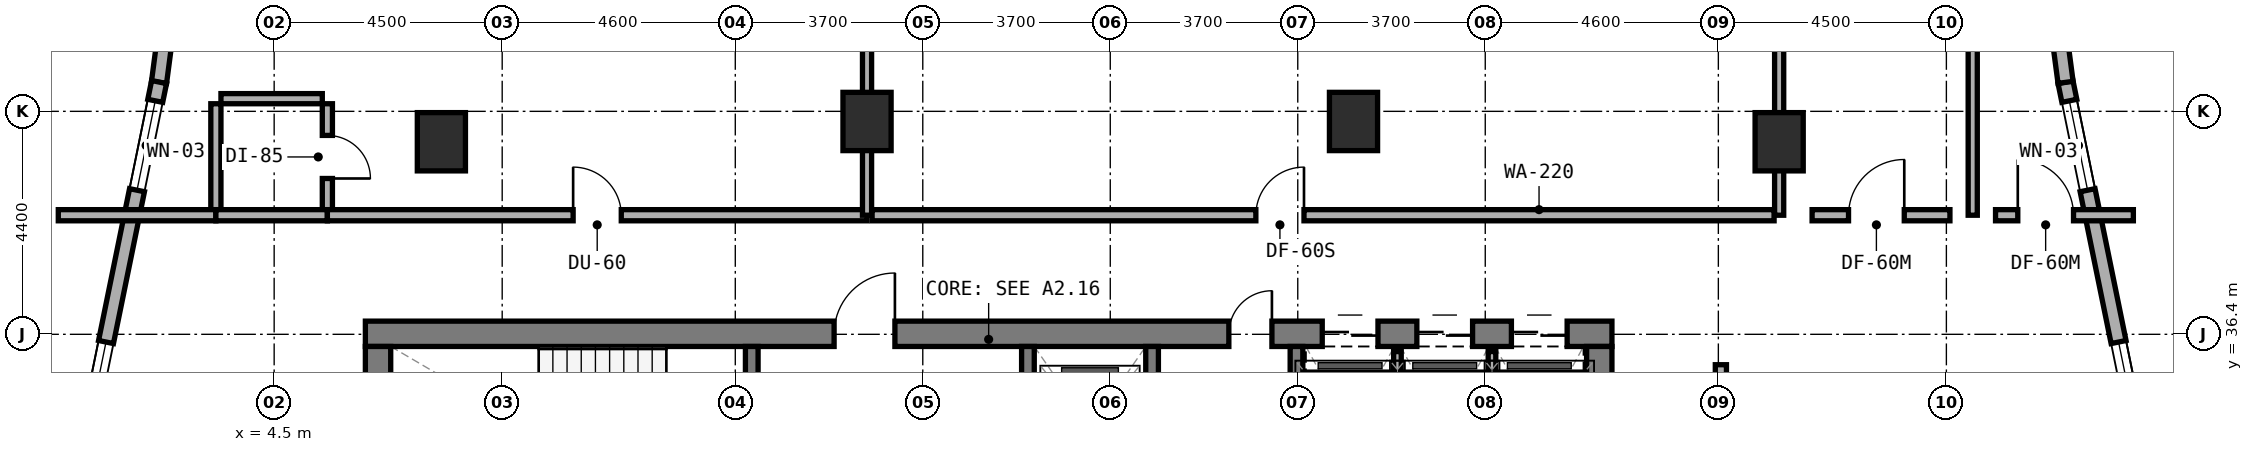
"""IFC4 building model, lengths in metres.
Left out: names, types, materials, properties, quantities, classifications, styles, units other than length and angle.
Written with IfcOpenShell. Run it as: python <this file> out.ifc"""

import sys

from ifc_helpers import new_model, si_unit, direction, frame, frame_2d, origin, origin_2d, place, context, subcontext, project, spatial, rectangle, extrude, element, fill, save


model = new_model("IFC4")
c1 = context("Model", 3, precision=1e-05, world=origin(), true_north=direction((0.0, 1.0)))
c2 = subcontext(c1, "Body", "Model", "MODEL_VIEW")
j1 = project(units=[si_unit("LENGTHUNIT", "METRE"), si_unit("PLANEANGLEUNIT", "RADIAN")], contexts=[c1])
p1 = place(None, origin())
s1 = spatial("IfcSite", under=j1, at=p1, CompositionType="ELEMENT")
p2 = place(p1, origin())
s2 = spatial("IfcBuilding", under=s1, at=p2, CompositionType="ELEMENT")
p3 = place(p2, frame((0.0, 0.0, 62.5)))
s3 = spatial("IfcBuildingStorey", under=s2, at=p3, CompositionType="ELEMENT", Elevation=62.5)
p4 = place(p3, frame((6.3, 36.41, 0.0), z_axis=(0.0, 0.0, 1.0), x_axis=(1.0, 0.0, 0.0)))
e1 = element("IfcWall", 1, at=p4, inside=s3, PredefinedType="SHEAR", context=c2, shape_type="SweptSolid", body=[
    extrude(rectangle(XDim=24.6, YDim=0.5, at=frame_2d((12.3, 0.0))), origin(), (0.0, 0.0, 1.0), 3.5),
])
p5 = place(p4, frame((9.25, 0.0, 0.0)))
e2 = element("IfcOpeningElement", 2, at=p5, cuts=e1, PredefinedType="OPENING", context=c2, shape_type="SweptSolid", body=[
    extrude(rectangle(XDim=1.2, YDim=2.15, at=frame_2d((0.6, 1.075))), frame((0.0, 0.26, 0.0), z_axis=(0.0, -1.0, 0.0), x_axis=(1.0, 0.0, 0.0)), (0.0, 0.0, 1.0), 0.52),
])
p6 = place(p4, frame((17.04, 0.0, 0.0)))
e3 = element("IfcOpeningElement", 3, at=p6, cuts=e1, PredefinedType="OPENING", context=c2, shape_type="SweptSolid", body=[
    extrude(rectangle(XDim=0.85, YDim=2.1, at=frame_2d((0.425, 1.05))), frame((0.0, 0.26, 0.0), z_axis=(0.0, -1.0, 0.0), x_axis=(1.0, 0.0, 0.0)), (0.0, 0.0, 1.0), 0.52),
])
p7 = place(p4, frame((18.883, 0.0, 0.0)))
e4 = element("IfcOpeningElement", 4, at=p7, cuts=e1, PredefinedType="OPENING", context=c2, shape_type="SweptSolid", body=[
    extrude(rectangle(XDim=1.1, YDim=2.15, at=frame_2d((0.55, 1.075))), frame((0.0, 0.26, 0.0), z_axis=(0.0, -1.0, 0.0), x_axis=(1.0, 0.0, 0.0)), (0.0, 0.0, 1.0), 0.52),
])
p8 = place(p4, frame((20.75, 0.0, 0.0)))
e5 = element("IfcOpeningElement", 5, at=p8, cuts=e1, PredefinedType="OPENING", context=c2, shape_type="SweptSolid", body=[
    extrude(rectangle(XDim=1.1, YDim=2.15, at=frame_2d((0.55, 1.075))), frame((0.0, 0.26, 0.0), z_axis=(0.0, -1.0, 0.0), x_axis=(1.0, 0.0, 0.0)), (0.0, 0.0, 1.0), 0.52),
])
p9 = place(p4, frame((22.616, 0.0, 0.0)))
e6 = element("IfcOpeningElement", 6, at=p9, cuts=e1, PredefinedType="OPENING", context=c2, shape_type="SweptSolid", body=[
    extrude(rectangle(XDim=1.1, YDim=2.15, at=frame_2d((0.55, 1.075))), frame((0.0, 0.26, 0.0), z_axis=(0.0, -1.0, 0.0), x_axis=(1.0, 0.0, 0.0)), (0.0, 0.0, 1.0), 0.52),
])
for number, where, z_axis, x_axis in (
    (7, (6.55, 33.0, 0.0), (0.0, 0.0, 1.0), (0.0, 1.0, 0.0)),
    (8, (30.65, 33.0, 0.0), (0.0, 0.0, 1.0), (0.0, 1.0, 0.0)),
):
    element("IfcWall", number, at=place(p3, frame(where, z_axis=z_axis, x_axis=x_axis)), inside=s3, PredefinedType="SHEAR", context=c2, shape_type="SweptSolid", body=[
        extrude(rectangle(XDim=3.16, YDim=0.5, at=frame_2d((1.58, 0.0))), origin(), (0.0, 0.0, 1.0), 3.5),
    ])
p10 = place(p3, frame((13.925, 33.0, 0.0), z_axis=(0.0, 0.0, 1.0), x_axis=(0.0, 1.0, 0.0)))
e9 = element("IfcWall", 9, at=p10, inside=s3, PredefinedType="STANDARD", context=c2, shape_type="SweptSolid", body=[
    extrude(rectangle(XDim=3.16, YDim=0.25, at=frame_2d((1.58, 0.0))), origin(), (0.0, 0.0, 1.0), 3.22),
])
p11 = place(p10, frame((0.98, 0.0, 0.0)))
e10 = element("IfcOpeningElement", 10, at=p11, cuts=e9, PredefinedType="OPENING", context=c2, shape_type="SweptSolid", body=[
    extrude(rectangle(XDim=1.1, YDim=2.15, at=frame_2d((0.55, 1.075))), frame((0.0, 0.135, 0.0), z_axis=(0.0, -1.0, 0.0), x_axis=(1.0, 0.0, 0.0)), (0.0, 0.0, 1.0), 0.27),
])
p12 = place(p3, frame((19.375, 33.0, 0.0), z_axis=(0.0, 0.0, 1.0), x_axis=(0.0, 1.0, 0.0)))
e11 = element("IfcWall", 11, at=p12, inside=s3, PredefinedType="STANDARD", context=c2, shape_type="SweptSolid", body=[
    extrude(rectangle(XDim=3.16, YDim=0.25, at=frame_2d((1.58, 0.0))), origin(), (0.0, 0.0, 1.0), 3.22),
])
p13 = place(p12, frame((0.98, 0.0, 0.0)))
e12 = element("IfcOpeningElement", 12, at=p13, cuts=e11, PredefinedType="OPENING", context=c2, shape_type="SweptSolid", body=[
    extrude(rectangle(XDim=1.1, YDim=2.15, at=frame_2d((0.55, 1.075))), frame((0.0, 0.135, 0.0), z_axis=(0.0, -1.0, 0.0), x_axis=(1.0, 0.0, 0.0)), (0.0, 0.0, 1.0), 0.27),
])
for number, where, z_axis, x_axis in (
    (13, (21.825, 33.0, 0.0), (0.0, 0.0, 1.0), (0.0, 1.0, 0.0)),
    (14, (24.675, 33.0, 0.0), (0.0, 0.0, 1.0), (0.0, 1.0, 0.0)),
):
    element("IfcWall", number, at=place(p3, frame(where, z_axis=z_axis, x_axis=x_axis)), inside=s3, PredefinedType="STANDARD", context=c2, shape_type="SweptSolid", body=[
        extrude(rectangle(XDim=3.16, YDim=0.25, at=frame_2d((1.58, 0.0))), origin(), (0.0, 0.0, 1.0), 3.22),
    ])
for number, where, z_axis, x_axis in (
    (15, (16.2, 40.6, 0.0), (0.0, 0.0, 1.0), (1.0, 0.0, 0.0)),
    (16, (25.8, 40.6, 0.0), (0.0, 0.0, 1.0), (1.0, 0.0, 0.0)),
    (17, (34.2, 40.2, 0.0), (0.0, 0.0, 1.0), (1.0, 0.0, 0.0)),
    (18, (7.8, 40.2, 0.0), (0.0, 0.0, 1.0), (1.0, 0.0, 0.0)),
):
    element("IfcColumn", number, at=place(p3, frame(where, z_axis=z_axis, x_axis=x_axis)), inside=s3, PredefinedType="COLUMN", context=c2, shape_type="SweptSolid", body=[
        extrude(rectangle(XDim=0.95, YDim=1.15, at=origin_2d()), origin(), (0.0, 0.0, 1.0), 3.5),
    ])
p14 = place(p3, frame((41.864, 31.516, 0.0), z_axis=(0.0, 0.0, 1.0), x_axis=(-0.199990901713, 0.979797754249, 0.0)))
e19 = element("IfcWall", 19, at=p14, inside=s3, PredefinedType="STANDARD", context=c2, shape_type="SweptSolid", body=[
    extrude(rectangle(XDim=10.065, YDim=0.3, at=frame_2d((5.033, 0.0))), origin(), (0.0, 0.0, 1.0), 3.22),
])
p15 = place(p14, frame((2.429, 0.0, 0.8)))
e20 = element("IfcOpeningElement", 20, at=p15, cuts=e19, PredefinedType="OPENING", context=c2, shape_type="SweptSolid", body=[
    extrude(rectangle(XDim=2.4, YDim=1.6, at=frame_2d((1.2, 0.8))), frame((0.0, 0.16, 0.0), z_axis=(0.0, -1.0, 0.0), x_axis=(1.0, 0.0, 0.0)), (0.0, 0.0, 1.0), 0.32),
])
p16 = place(p14, frame((7.887, 0.0, 0.85)))
e21 = element("IfcOpeningElement", 21, at=p16, cuts=e19, PredefinedType="OPENING", context=c2, shape_type="SweptSolid", body=[
    extrude(rectangle(XDim=1.8, YDim=1.5, at=frame_2d((0.9, 0.75))), frame((0.0, 0.16, 0.0), z_axis=(0.0, -1.0, 0.0), x_axis=(1.0, 0.0, 0.0)), (0.0, 0.0, 1.0), 0.32),
])
p17 = place(p3, frame((39.852, 41.372, 0.0), z_axis=(0.0, 0.0, 1.0), x_axis=(-0.131174864804, 0.991359246108, 0.0)))
e22 = element("IfcWall", 22, at=p17, inside=s3, PredefinedType="STANDARD", context=c2, shape_type="SweptSolid", body=[
    extrude(rectangle(XDim=0.938, YDim=0.3, at=frame_2d((0.469, 0.0))), origin(), (0.0, 0.0, 1.0), 3.22),
])
p18 = place(p3, frame((2.355, 42.337, 0.0), z_axis=(0.0, 0.0, 1.0), x_axis=(-0.130454512571, -0.991454295543, 0.0)))
e23 = element("IfcWall", 23, at=p18, inside=s3, PredefinedType="STANDARD", context=c2, shape_type="SweptSolid", body=[
    extrude(rectangle(XDim=0.973, YDim=0.3, at=frame_2d((0.487, 0.0))), origin(), (0.0, 0.0, 1.0), 3.22),
])
p19 = place(p3, frame((2.229, 41.378, 0.0), z_axis=(0.0, 0.0, 1.0), x_axis=(-0.199990901713, -0.979797754249, 0.0)))
e24 = element("IfcWall", 24, at=p19, inside=s3, PredefinedType="STANDARD", context=c2, shape_type="SweptSolid", body=[
    extrude(rectangle(XDim=10.065, YDim=0.3, at=frame_2d((5.033, 0.0))), origin(), (0.0, 0.0, 1.0), 3.22),
])
p20 = place(p19, frame((0.378, 0.0, 0.85)))
e25 = element("IfcOpeningElement", 25, at=p20, cuts=e24, PredefinedType="OPENING", context=c2, shape_type="SweptSolid", body=[
    extrude(rectangle(XDim=1.8, YDim=1.5, at=frame_2d((0.9, 0.75))), frame((0.0, 0.16, 0.0), z_axis=(0.0, -1.0, 0.0), x_axis=(1.0, 0.0, 0.0)), (0.0, 0.0, 1.0), 0.32),
])
p21 = place(p19, frame((5.236, 0.0, 0.8)))
e26 = element("IfcOpeningElement", 26, at=p21, cuts=e24, PredefinedType="OPENING", context=c2, shape_type="SweptSolid", body=[
    extrude(rectangle(XDim=2.4, YDim=1.6, at=frame_2d((1.2, 0.8))), frame((0.0, 0.16, 0.0), z_axis=(0.0, -1.0, 0.0), x_axis=(1.0, 0.0, 0.0)), (0.0, 0.0, 1.0), 0.32),
])
p22 = place(p3, frame((26.667, 33.1, 0.0), z_axis=(0.0, 0.0, 1.0), x_axis=(0.0, 1.0, 0.0)))
e27 = element("IfcWall", 27, at=p22, inside=s3, PredefinedType="PARTITIONING", context=c2, shape_type="SweptSolid", body=[
    extrude(rectangle(XDim=2.96, YDim=0.15, at=frame_2d((1.48, 0.0))), origin(), (0.0, 0.0, 1.0), 3.22),
])
p23 = place(p3, frame((28.533, 33.1, 0.0), z_axis=(0.0, 0.0, 1.0), x_axis=(0.0, 1.0, 0.0)))
e28 = element("IfcWall", 28, at=p23, inside=s3, PredefinedType="PARTITIONING", context=c2, shape_type="SweptSolid", body=[
    extrude(rectangle(XDim=2.96, YDim=0.15, at=frame_2d((1.48, 0.0))), origin(), (0.0, 0.0, 1.0), 2.495),
])
p24 = place(p3, frame((5.55, 38.85, 0.0), z_axis=(0.0, 0.0, 1.0), x_axis=(0.0, 1.0, 0.0)))
e29 = element("IfcWall", 29, at=p24, inside=s3, PredefinedType="PLUMBINGWALL", context=c2, shape_type="SweptSolid", body=[
    extrude(rectangle(XDim=2.1, YDim=0.2, at=frame_2d((1.05, 0.0))), origin(), (0.0, 0.0, 1.0), 3.22),
])
p25 = place(p24, frame((0.625, 0.0, 0.0)))
e30 = element("IfcOpeningElement", 30, at=p25, cuts=e29, PredefinedType="OPENING", context=c2, shape_type="SweptSolid", body=[
    extrude(rectangle(XDim=0.85, YDim=2.1, at=frame_2d((0.425, 1.05))), frame((0.0, 0.11, 0.0), z_axis=(0.0, -1.0, 0.0), x_axis=(1.0, 0.0, 0.0)), (0.0, 0.0, 1.0), 0.22),
])
p26 = place(p3, frame((3.45, 41.05, 0.0), z_axis=(0.0, 0.0, 1.0), x_axis=(1.0, 0.0, 0.0)))
e31 = element("IfcWall", 31, at=p26, inside=s3, PredefinedType="PLUMBINGWALL", context=c2, shape_type="SweptSolid", body=[
    extrude(rectangle(XDim=2.0, YDim=0.2, at=frame_2d((1.0, 0.0))), origin(), (0.0, 0.0, 1.0), 3.22),
])
p27 = place(p3, frame((3.35, 38.85, 0.0), z_axis=(0.0, 0.0, 1.0), x_axis=(0.0, 1.0, 0.0)))
e32 = element("IfcWall", 32, at=p27, inside=s3, PredefinedType="PLUMBINGWALL", context=c2, shape_type="SweptSolid", body=[
    extrude(rectangle(XDim=2.1, YDim=0.2, at=frame_2d((1.05, 0.0))), origin(), (0.0, 0.0, 1.0), 3.22),
])
p28 = place(p3, frame((0.24, 38.75, 0.0), z_axis=(0.0, 0.0, 1.0), x_axis=(1.0, 0.0, 0.0)))
e33 = element("IfcWall", 33, at=p28, inside=s3, PredefinedType="SOLIDWALL", context=c2, shape_type="SweptSolid", body=[
    extrude(rectangle(XDim=3.11, YDim=0.22, at=frame_2d((1.555, 0.0))), origin(), (0.0, 0.0, 1.0), 3.22),
])
p29 = place(p3, frame((3.35, 38.75, 0.0), z_axis=(0.0, 0.0, 1.0), x_axis=(1.0, 0.0, 0.0)))
e34 = element("IfcWall", 34, at=p29, inside=s3, PredefinedType="SOLIDWALL", context=c2, shape_type="SweptSolid", body=[
    extrude(rectangle(XDim=2.2, YDim=0.22, at=frame_2d((1.1, 0.0))), origin(), (0.0, 0.0, 1.0), 3.22),
])
p30 = place(p3, frame((5.55, 38.75, 0.0), z_axis=(0.0, 0.0, 1.0), x_axis=(1.0, 0.0, 0.0)))
e35 = element("IfcWall", 35, at=p30, inside=s3, PredefinedType="SOLIDWALL", context=c2, shape_type="SweptSolid", body=[
    extrude(rectangle(XDim=10.65, YDim=0.22, at=frame_2d((5.325, 0.0))), origin(), (0.0, 0.0, 1.0), 2.495),
])
p31 = place(p30, frame((4.85, 0.0, 0.0)))
e36 = element("IfcOpeningElement", 36, at=p31, cuts=e35, PredefinedType="OPENING", context=c2, shape_type="SweptSolid", body=[
    extrude(rectangle(XDim=0.95, YDim=2.1, at=frame_2d((0.475, 1.05))), frame((0.0, 0.12, 0.0), z_axis=(0.0, -1.0, 0.0), x_axis=(1.0, 0.0, 0.0)), (0.0, 0.0, 1.0), 0.24),
])
p32 = place(p3, frame((16.2, 38.75, 0.0), z_axis=(0.0, 0.0, 1.0), x_axis=(0.0, 1.0, 0.0)))
e37 = element("IfcWall", 37, at=p32, inside=s3, PredefinedType="SOLIDWALL", context=c2, shape_type="SweptSolid", body=[
    extrude(rectangle(XDim=8.19, YDim=0.18, at=frame_2d((4.095, 0.0))), origin(), (0.0, 0.0, 1.0), 2.495),
])
p33 = place(p3, frame((16.3, 38.75, 0.0), z_axis=(0.0, 0.0, 1.0), x_axis=(1.0, 0.0, 0.0)))
e38 = element("IfcWall", 38, at=p33, inside=s3, PredefinedType="SOLIDWALL", context=c2, shape_type="SweptSolid", body=[
    extrude(rectangle(XDim=17.8, YDim=0.22, at=frame_2d((8.9, 0.0))), origin(), (0.0, 0.0, 1.0), 2.495),
])
p34 = place(p33, frame((7.573, 0.0, 0.0)))
e39 = element("IfcOpeningElement", 39, at=p34, cuts=e38, PredefinedType="OPENING", context=c2, shape_type="SweptSolid", body=[
    extrude(rectangle(XDim=0.95, YDim=2.1, at=frame_2d((0.475, 1.05))), frame((0.0, 0.12, 0.0), z_axis=(0.0, -1.0, 0.0), x_axis=(1.0, 0.0, 0.0)), (0.0, 0.0, 1.0), 0.24),
])
p35 = place(p3, frame((34.2, 38.75, 0.0), z_axis=(0.0, 0.0, 1.0), x_axis=(0.0, 1.0, 0.0)))
e40 = element("IfcWall", 40, at=p35, inside=s3, PredefinedType="SOLIDWALL", context=c2, shape_type="SweptSolid", body=[
    extrude(rectangle(XDim=6.674, YDim=0.18, at=frame_2d((3.337, 0.0))), origin(), (0.0, 0.0, 1.0), 2.495),
])
p36 = place(p3, frame((38.02, 38.75, 0.0), z_axis=(0.0, 0.0, 1.0), x_axis=(0.0, 1.0, 0.0)))
e41 = element("IfcWall", 41, at=p36, inside=s3, PredefinedType="SOLIDWALL", context=c2, shape_type="SweptSolid", body=[
    extrude(rectangle(XDim=5.778, YDim=0.18, at=frame_2d((2.889, 0.0))), origin(), (0.0, 0.0, 1.0), 3.22),
])
p37 = place(p3, frame((34.85, 38.75, 0.0), z_axis=(0.0, 0.0, 1.0), x_axis=(1.0, 0.0, 0.0)))
e42 = element("IfcWall", 42, at=p37, inside=s3, PredefinedType="SOLIDWALL", context=c2, shape_type="SweptSolid", body=[
    extrude(rectangle(XDim=2.72, YDim=0.22, at=frame_2d((1.36, 0.0))), origin(), (0.0, 0.0, 1.0), 3.22),
])
p38 = place(p37, frame((0.719, 0.0, 0.0)))
e43 = element("IfcOpeningElement", 43, at=p38, cuts=e42, PredefinedType="OPENING", context=c2, shape_type="SweptSolid", body=[
    extrude(rectangle(XDim=1.1, YDim=2.1, at=frame_2d((0.55, 1.05))), frame((0.0, 0.12, 0.0), z_axis=(0.0, -1.0, 0.0), x_axis=(1.0, 0.0, 0.0)), (0.0, 0.0, 1.0), 0.24),
])
p39 = place(p3, frame((38.47, 38.75, 0.0), z_axis=(0.0, 0.0, 1.0), x_axis=(1.0, 0.0, 0.0)))
e44 = element("IfcWall", 44, at=p39, inside=s3, PredefinedType="SOLIDWALL", context=c2, shape_type="SweptSolid", body=[
    extrude(rectangle(XDim=2.72, YDim=0.22, at=frame_2d((1.36, 0.0))), origin(), (0.0, 0.0, 1.0), 3.22),
])
p40 = place(p39, frame((0.439, 0.0, 0.0)))
e45 = element("IfcOpeningElement", 45, at=p40, cuts=e44, PredefinedType="OPENING", context=c2, shape_type="SweptSolid", body=[
    extrude(rectangle(XDim=1.1, YDim=2.1, at=frame_2d((0.55, 1.05))), frame((0.0, 0.12, 0.0), z_axis=(0.0, -1.0, 0.0), x_axis=(1.0, 0.0, 0.0)), (0.0, 0.0, 1.0), 0.24),
])
p41 = place(p3, frame((33.05, 25.66, 0.0), z_axis=(0.0, 0.0, 1.0), x_axis=(0.0, 1.0, 0.0)))
e46 = element("IfcWall", 46, at=p41, inside=s3, PredefinedType="SOLIDWALL", context=c2, shape_type="SweptSolid", body=[
    extrude(rectangle(XDim=10.14, YDim=0.22, at=frame_2d((5.07, 0.0))), origin(), (0.0, 0.0, 1.0), 2.495),
])
p42 = place(p41, frame((4.595, 0.0, 0.0)))
e47 = element("IfcOpeningElement", 47, at=p42, cuts=e46, PredefinedType="OPENING", context=c2, shape_type="SweptSolid", body=[
    extrude(rectangle(XDim=0.95, YDim=2.1, at=frame_2d((0.475, 1.05))), frame((0.0, 0.12, 0.0), z_axis=(0.0, -1.0, 0.0), x_axis=(1.0, 0.0, 0.0)), (0.0, 0.0, 1.0), 0.24),
])
p43 = place(p15, origin())
e48 = element("IfcWindow", 48, at=p43, inside=s3, PartitioningType="SINGLE_PANEL", PredefinedType="WINDOW", context=c2, shape_type="SweptSolid", body=[
    extrude(rectangle(XDim=2.4, YDim=1.6, at=frame_2d((1.2, 0.8))), frame((0.0, 0.03, 0.0), z_axis=(0.0, -1.0, 0.0), x_axis=(1.0, 0.0, 0.0)), (0.0, 0.0, 1.0), 0.06),
])
fill(e20, e48)
p44 = place(p16, origin())
e49 = element("IfcWindow", 49, at=p44, inside=s3, PartitioningType="SINGLE_PANEL", PredefinedType="WINDOW", context=c2, shape_type="SweptSolid", body=[
    extrude(rectangle(XDim=1.8, YDim=1.5, at=frame_2d((0.9, 0.75))), frame((0.0, 0.03, 0.0), z_axis=(0.0, -1.0, 0.0), x_axis=(1.0, 0.0, 0.0)), (0.0, 0.0, 1.0), 0.06),
])
fill(e21, e49)
p45 = place(p20, origin())
e50 = element("IfcWindow", 50, at=p45, inside=s3, PartitioningType="SINGLE_PANEL", PredefinedType="WINDOW", context=c2, shape_type="SweptSolid", body=[
    extrude(rectangle(XDim=1.8, YDim=1.5, at=frame_2d((0.9, 0.75))), frame((0.0, 0.03, 0.0), z_axis=(0.0, -1.0, 0.0), x_axis=(1.0, 0.0, 0.0)), (0.0, 0.0, 1.0), 0.06),
])
fill(e25, e50)
p46 = place(p21, origin())
e51 = element("IfcWindow", 51, at=p46, inside=s3, PartitioningType="SINGLE_PANEL", PredefinedType="WINDOW", context=c2, shape_type="SweptSolid", body=[
    extrude(rectangle(XDim=2.4, YDim=1.6, at=frame_2d((1.2, 0.8))), frame((0.0, 0.03, 0.0), z_axis=(0.0, -1.0, 0.0), x_axis=(1.0, 0.0, 0.0)), (0.0, 0.0, 1.0), 0.06),
])
fill(e26, e51)
p47 = place(p5, origin())
e52 = element("IfcDoor", 52, at=p47, inside=s3, OperationType="SINGLE_SWING_RIGHT", PredefinedType="DOOR", context=c2, shape_type="SweptSolid", body=[
    extrude(rectangle(XDim=1.2, YDim=2.15, at=frame_2d((0.6, 1.075))), frame((0.0, 0.025, 0.0), z_axis=(0.0, -1.0, 0.0), x_axis=(1.0, 0.0, 0.0)), (0.0, 0.0, 1.0), 0.05),
])
fill(e2, e52)
p48 = place(p6, origin())
e53 = element("IfcDoor", 53, at=p48, inside=s3, OperationType="SINGLE_SWING_RIGHT", PredefinedType="DOOR", context=c2, shape_type="SweptSolid", body=[
    extrude(rectangle(XDim=0.85, YDim=2.1, at=frame_2d((0.425, 1.05))), frame((0.0, 0.025, 0.0), z_axis=(0.0, -1.0, 0.0), x_axis=(1.0, 0.0, 0.0)), (0.0, 0.0, 1.0), 0.05),
])
fill(e3, e53)
p49 = place(p7, origin())
e54 = element("IfcDoor", 54, at=p49, inside=s3, OperationType="DOUBLE_DOOR_SLIDING", PredefinedType="DOOR", context=c2, shape_type="SweptSolid", body=[
    extrude(rectangle(XDim=1.1, YDim=2.15, at=frame_2d((0.55, 1.075))), frame((0.0, 0.025, 0.0), z_axis=(0.0, -1.0, 0.0), x_axis=(1.0, 0.0, 0.0)), (0.0, 0.0, 1.0), 0.05),
])
fill(e4, e54)
p50 = place(p8, origin())
e55 = element("IfcDoor", 55, at=p50, inside=s3, OperationType="DOUBLE_DOOR_SLIDING", PredefinedType="DOOR", context=c2, shape_type="SweptSolid", body=[
    extrude(rectangle(XDim=1.1, YDim=2.15, at=frame_2d((0.55, 1.075))), frame((0.0, 0.025, 0.0), z_axis=(0.0, -1.0, 0.0), x_axis=(1.0, 0.0, 0.0)), (0.0, 0.0, 1.0), 0.05),
])
fill(e5, e55)
p51 = place(p9, origin())
e56 = element("IfcDoor", 56, at=p51, inside=s3, OperationType="DOUBLE_DOOR_SLIDING", PredefinedType="DOOR", context=c2, shape_type="SweptSolid", body=[
    extrude(rectangle(XDim=1.1, YDim=2.15, at=frame_2d((0.55, 1.075))), frame((0.0, 0.025, 0.0), z_axis=(0.0, -1.0, 0.0), x_axis=(1.0, 0.0, 0.0)), (0.0, 0.0, 1.0), 0.05),
])
fill(e6, e56)
p52 = place(p25, frame((0.85, 0.0, 0.0), z_axis=(0.0, 0.0, 1.0), x_axis=(-1.0, 0.0, 0.0)))
e57 = element("IfcDoor", 57, at=p52, inside=s3, OperationType="SINGLE_SWING_RIGHT", PredefinedType="DOOR", context=c2, shape_type="SweptSolid", body=[
    extrude(rectangle(XDim=0.85, YDim=2.1, at=frame_2d((0.425, 1.05))), frame((0.0, 0.025, 0.0), z_axis=(0.0, -1.0, 0.0), x_axis=(1.0, 0.0, 0.0)), (0.0, 0.0, 1.0), 0.05),
])
fill(e30, e57)
p53 = place(p31, origin())
e58 = element("IfcDoor", 58, at=p53, inside=s3, OperationType="SINGLE_SWING_LEFT", PredefinedType="DOOR", context=c2, shape_type="SweptSolid", body=[
    extrude(rectangle(XDim=0.95, YDim=2.1, at=frame_2d((0.475, 1.05))), frame((0.0, 0.025, 0.0), z_axis=(0.0, -1.0, 0.0), x_axis=(1.0, 0.0, 0.0)), (0.0, 0.0, 1.0), 0.05),
])
fill(e36, e58)
p54 = place(p34, origin())
e59 = element("IfcDoor", 59, at=p54, inside=s3, OperationType="SINGLE_SWING_RIGHT", PredefinedType="DOOR", context=c2, shape_type="SweptSolid", body=[
    extrude(rectangle(XDim=0.95, YDim=2.1, at=frame_2d((0.475, 1.05))), frame((0.0, 0.025, 0.0), z_axis=(0.0, -1.0, 0.0), x_axis=(1.0, 0.0, 0.0)), (0.0, 0.0, 1.0), 0.05),
])
fill(e39, e59)
p55 = place(p38, origin())
e60 = element("IfcDoor", 60, at=p55, inside=s3, OperationType="SINGLE_SWING_RIGHT", PredefinedType="DOOR", context=c2, shape_type="SweptSolid", body=[
    extrude(rectangle(XDim=1.1, YDim=2.1, at=frame_2d((0.55, 1.05))), frame((0.0, 0.025, 0.0), z_axis=(0.0, -1.0, 0.0), x_axis=(1.0, 0.0, 0.0)), (0.0, 0.0, 1.0), 0.05),
])
fill(e43, e60)
p56 = place(p40, origin())
e61 = element("IfcDoor", 61, at=p56, inside=s3, OperationType="SINGLE_SWING_LEFT", PredefinedType="DOOR", context=c2, shape_type="SweptSolid", body=[
    extrude(rectangle(XDim=1.1, YDim=2.1, at=frame_2d((0.55, 1.05))), frame((0.0, 0.025, 0.0), z_axis=(0.0, -1.0, 0.0), x_axis=(1.0, 0.0, 0.0)), (0.0, 0.0, 1.0), 0.05),
])
fill(e45, e61)
save(model, sys.argv[1])
